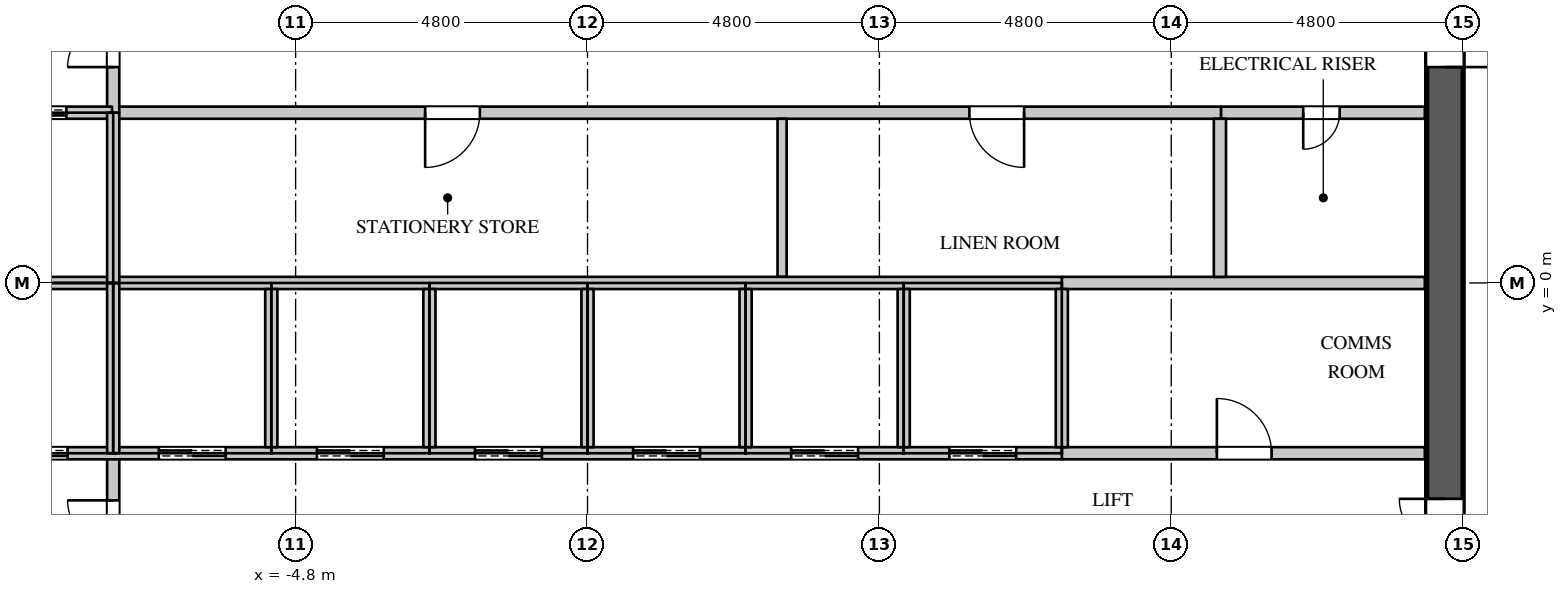
"""IFC4 building model, lengths in metres.
Left out: names, types, materials, properties, quantities, classifications, styles, units other than length and angle.
Written with IfcOpenShell. Run it as: python <this file> out.ifc"""

import sys

from ifc_helpers import new_model, si_unit, direction, frame, frame_2d, origin, place, context, subcontext, project, spatial, rectangle, extrude, element, fill, save


model = new_model("IFC4")
c1 = context("Model", 3, precision=1e-05, world=origin(), true_north=direction((0.0, 1.0)))
c2 = subcontext(c1, "Body", "Model", "MODEL_VIEW")
j1 = project(units=[si_unit("LENGTHUNIT", "METRE"), si_unit("PLANEANGLEUNIT", "RADIAN")], contexts=[c1])
p1 = place(None, origin())
s1 = spatial("IfcSite", under=j1, at=p1, CompositionType="ELEMENT")
p2 = place(p1, origin())
s2 = spatial("IfcBuilding", under=s1, at=p2, CompositionType="ELEMENT")
p3 = place(p2, frame((0.0, 0.0, 239.1)))
s3 = spatial("IfcBuildingStorey", under=s2, at=p3, CompositionType="ELEMENT", Elevation=239.1)
p4 = place(p3, frame((14.1, -11.4, 0.0), z_axis=(0.0, 0.0, 1.0), x_axis=(0.0, 1.0, 0.0)))
e1 = element("IfcWall", 1, at=p4, inside=s3, PredefinedType="SHEAR", context=c2, shape_type="SweptSolid", body=[
    extrude(rectangle(XDim=22.8, YDim=0.6, at=frame_2d((11.4, 0.0))), origin(), (0.0, 0.0, 1.0), 4.2),
])
p5 = place(p4, frame((20.45, 0.0, 0.0)))
e2 = element("IfcOpeningElement", 2, at=p5, cuts=e1, PredefinedType="OPENING", context=c2, shape_type="SweptSolid", body=[
    extrude(rectangle(XDim=1.1, YDim=2.2, at=frame_2d((0.55, 1.1))), frame((0.0, 0.31, 0.0), z_axis=(0.0, -1.0, 0.0), x_axis=(1.0, 0.0, 0.0)), (0.0, 0.0, 1.0), 0.62),
])
p6 = place(p4, frame((1.25, 0.0, 0.0)))
e3 = element("IfcOpeningElement", 3, at=p6, cuts=e1, PredefinedType="OPENING", context=c2, shape_type="SweptSolid", body=[
    extrude(rectangle(XDim=1.1, YDim=2.2, at=frame_2d((0.55, 1.1))), frame((0.0, 0.31, 0.0), z_axis=(0.0, -1.0, 0.0), x_axis=(1.0, 0.0, 0.0)), (0.0, 0.0, 1.0), 0.62),
])
p7 = place(p4, frame((14.95, 0.0, 0.0)))
e4 = element("IfcOpeningElement", 4, at=p7, cuts=e1, PredefinedType="OPENING", context=c2, shape_type="SweptSolid", body=[
    extrude(rectangle(XDim=1.5, YDim=2.4, at=frame_2d((0.75, 1.2))), frame((0.0, 0.31, 0.0), z_axis=(0.0, -1.0, 0.0), x_axis=(1.0, 0.0, 0.0)), (0.0, 0.0, 1.0), 0.62),
])
p8 = place(p4, frame((6.35, 0.0, 0.0)))
e5 = element("IfcOpeningElement", 5, at=p8, cuts=e1, PredefinedType="OPENING", context=c2, shape_type="SweptSolid", body=[
    extrude(rectangle(XDim=1.5, YDim=2.4, at=frame_2d((0.75, 1.2))), frame((0.0, 0.31, 0.0), z_axis=(0.0, -1.0, 0.0), x_axis=(1.0, 0.0, 0.0)), (0.0, 0.0, 1.0), 0.62),
])
p9 = place(p3, frame((-7.82, 2.8, 0.0), z_axis=(0.0, 0.0, 1.0), x_axis=(1.0, 0.0, 0.0)))
e6 = element("IfcWall", 6, at=p9, inside=s3, PredefinedType="PARTITIONING", context=c2, shape_type="SweptSolid", body=[
    extrude(rectangle(XDim=18.24, YDim=0.2, at=frame_2d((9.12, 0.0))), origin(), (0.0, 0.0, 1.0), 3.95),
])
p10 = place(p9, frame((5.15, 0.0, 0.0)))
e7 = element("IfcOpeningElement", 7, at=p10, cuts=e6, PredefinedType="OPENING", context=c2, shape_type="SweptSolid", body=[
    extrude(rectangle(XDim=0.9, YDim=2.2, at=frame_2d((0.45, 1.1))), frame((0.0, 0.11, 0.0), z_axis=(0.0, -1.0, 0.0), x_axis=(1.0, 0.0, 0.0)), (0.0, 0.0, 1.0), 0.22),
])
p11 = place(p9, frame((14.1, 0.0, 0.0)))
e8 = element("IfcOpeningElement", 8, at=p11, cuts=e6, PredefinedType="OPENING", context=c2, shape_type="SweptSolid", body=[
    extrude(rectangle(XDim=0.9, YDim=2.2, at=frame_2d((0.45, 1.1))), frame((0.0, 0.11, 0.0), z_axis=(0.0, -1.0, 0.0), x_axis=(1.0, 0.0, 0.0)), (0.0, 0.0, 1.0), 0.22),
])
p12 = place(p3, frame((-7.8, -8.075, 0.0), z_axis=(0.0, 0.0, 1.0), x_axis=(0.0, 1.0, 0.0)))
e9 = element("IfcWall", 9, at=p12, inside=s3, PredefinedType="PARTITIONING", context=c2, shape_type="SweptSolid", body=[
    extrude(rectangle(XDim=5.275, YDim=0.2, at=frame_2d((2.637, 0.0))), origin(), (0.0, 0.0, 1.0), 3.95),
])
p13 = place(p12, frame((3.0, 0.0, 0.0)))
e10 = element("IfcOpeningElement", 10, at=p13, cuts=e9, PredefinedType="OPENING", context=c2, shape_type="SweptSolid", body=[
    extrude(rectangle(XDim=1.5, YDim=2.4, at=frame_2d((0.75, 1.2))), frame((0.0, 0.11, 0.0), z_axis=(0.0, -1.0, 0.0), x_axis=(1.0, 0.0, 0.0)), (0.0, 0.0, 1.0), 0.22),
])
p14 = place(p3, frame((-7.8, 2.8, 0.0), z_axis=(0.0, 0.0, 1.0), x_axis=(0.0, 1.0, 0.0)))
e11 = element("IfcWall", 11, at=p14, inside=s3, PredefinedType="PARTITIONING", context=c2, shape_type="SweptSolid", body=[
    extrude(rectangle(XDim=5.275, YDim=0.2, at=frame_2d((2.637, 0.0))), origin(), (0.0, 0.0, 1.0), 3.95),
])
p15 = place(p14, frame((0.75, 0.0, 0.0)))
e12 = element("IfcOpeningElement", 12, at=p15, cuts=e11, PredefinedType="OPENING", context=c2, shape_type="SweptSolid", body=[
    extrude(rectangle(XDim=1.5, YDim=2.4, at=frame_2d((0.75, 1.2))), frame((0.0, 0.11, 0.0), z_axis=(0.0, -1.0, 0.0), x_axis=(1.0, 0.0, 0.0)), (0.0, 0.0, 1.0), 0.22),
])
p16 = place(p3, frame((3.2, 0.1, 0.0), z_axis=(0.0, 0.0, 1.0), x_axis=(0.0, 1.0, 0.0)))
e13 = element("IfcWall", 13, at=p16, inside=s3, PredefinedType="PARTITIONING", context=c2, shape_type="SweptSolid", body=[
    extrude(rectangle(XDim=2.6, YDim=0.15, at=frame_2d((1.3, 0.0))), origin(), (0.0, 0.0, 1.0), 3.95),
])
p17 = place(p3, frame((7.8, -2.8, 0.0), z_axis=(0.0, 0.0, 1.0), x_axis=(1.0, 0.0, 0.0)))
e14 = element("IfcWall", 14, at=p17, inside=s3, PredefinedType="PARTITIONING", context=c2, shape_type="SweptSolid", body=[
    extrude(rectangle(XDim=5.97, YDim=0.2, at=frame_2d((2.985, 0.0))), origin(), (0.0, 0.0, 1.0), 3.95),
])
p18 = place(p17, frame((2.55, 0.0, 0.0)))
e15 = element("IfcOpeningElement", 15, at=p18, cuts=e14, PredefinedType="OPENING", context=c2, shape_type="SweptSolid", body=[
    extrude(rectangle(XDim=0.9, YDim=2.2, at=frame_2d((0.45, 1.1))), frame((0.0, 0.11, 0.0), z_axis=(0.0, -1.0, 0.0), x_axis=(1.0, 0.0, 0.0)), (0.0, 0.0, 1.0), 0.22),
])
p19 = place(p3, frame((7.8, 0.0, 0.0), z_axis=(0.0, 0.0, 1.0), x_axis=(1.0, 0.0, 0.0)))
e16 = element("IfcWall", 16, at=p19, inside=s3, PredefinedType="PARTITIONING", context=c2, shape_type="SweptSolid", body=[
    extrude(rectangle(XDim=5.97, YDim=0.2, at=frame_2d((2.985, 0.0))), origin(), (0.0, 0.0, 1.0), 3.95),
])
p20 = place(p3, frame((10.42, 2.8, 0.0), z_axis=(0.0, 0.0, 1.0), x_axis=(1.0, 0.0, 0.0)))
e17 = element("IfcWall", 17, at=p20, inside=s3, PredefinedType="PARTITIONING", context=c2, shape_type="SweptSolid", body=[
    extrude(rectangle(XDim=3.35, YDim=0.2, at=frame_2d((1.675, 0.0))), origin(), (0.0, 0.0, 1.0), 3.95),
])
p21 = place(p20, frame((1.35, 0.0, 0.0)))
e18 = element("IfcOpeningElement", 18, at=p21, cuts=e17, PredefinedType="OPENING", context=c2, shape_type="SweptSolid", body=[
    extrude(rectangle(XDim=0.6, YDim=2.0, at=frame_2d((0.3, 1.0))), frame((0.0, 0.11, 0.0), z_axis=(0.0, -1.0, 0.0), x_axis=(1.0, 0.0, 0.0)), (0.0, 0.0, 1.0), 0.22),
])
p22 = place(p3, frame((10.4, 0.1, 0.0), z_axis=(0.0, 0.0, 1.0), x_axis=(0.0, 1.0, 0.0)))
e19 = element("IfcWall", 19, at=p22, inside=s3, PredefinedType="PARTITIONING", context=c2, shape_type="SweptSolid", body=[
    extrude(rectangle(XDim=2.6, YDim=0.2, at=frame_2d((1.3, 0.0))), origin(), (0.0, 0.0, 1.0), 3.95),
])
p23 = place(p3, frame((-13.77, 0.0, 0.0), z_axis=(0.0, 0.0, 1.0), x_axis=(1.0, 0.0, 0.0)))
e20 = element("IfcWall", 20, at=p23, inside=s3, PredefinedType="PARTITIONING", context=c2, shape_type="SweptSolid", body=[
    extrude(rectangle(XDim=21.57, YDim=0.2, at=frame_2d((10.785, 0.0))), origin(), (0.0, 0.0, 1.0), 3.95),
])
p24 = place(p3, frame((-13.77, 2.8, 0.0), z_axis=(0.0, 0.0, 1.0), x_axis=(1.0, 0.0, 0.0)))
e21 = element("IfcWall", 21, at=p24, inside=s3, PredefinedType="PARTITIONING", context=c2, shape_type="SweptSolid", body=[
    extrude(rectangle(XDim=5.95, YDim=0.2, at=frame_2d((2.975, 0.0))), origin(), (0.0, 0.0, 1.0), 3.95),
])
p25 = place(p24, frame((1.1, 0.0, 0.0)))
e22 = element("IfcOpeningElement", 22, at=p25, cuts=e21, PredefinedType="OPENING", context=c2, shape_type="SweptSolid", body=[
    extrude(rectangle(XDim=1.1, YDim=2.2, at=frame_2d((0.55, 1.1))), frame((0.0, 0.11, 0.0), z_axis=(0.0, -1.0, 0.0), x_axis=(1.0, 0.0, 0.0)), (0.0, 0.0, 1.0), 0.22),
])
p26 = place(p24, frame((4.1, 0.0, 0.0)))
e23 = element("IfcOpeningElement", 23, at=p26, cuts=e21, PredefinedType="OPENING", context=c2, shape_type="SweptSolid", body=[
    extrude(rectangle(XDim=1.1, YDim=2.2, at=frame_2d((0.55, 1.1))), frame((0.0, 0.11, 0.0), z_axis=(0.0, -1.0, 0.0), x_axis=(1.0, 0.0, 0.0)), (0.0, 0.0, 1.0), 0.22),
])
p27 = place(p3, frame((-10.4, -2.8, 0.0), z_axis=(0.0, 0.0, 1.0), x_axis=(1.0, 0.0, 0.0)))
e24 = element("IfcWall", 24, at=p27, inside=s3, PredefinedType="PARTITIONING", context=c2, shape_type="SweptSolid", body=[
    extrude(rectangle(XDim=18.2, YDim=0.2, at=frame_2d((9.1, 0.0))), origin(), (0.0, 0.0, 1.0), 3.95),
])
p28 = place(p27, frame((0.75, 0.0, 0.0)))
e25 = element("IfcOpeningElement", 25, at=p28, cuts=e24, PredefinedType="OPENING", context=c2, shape_type="SweptSolid", body=[
    extrude(rectangle(XDim=1.1, YDim=2.2, at=frame_2d((0.55, 1.1))), frame((0.0, 0.11, 0.0), z_axis=(0.0, -1.0, 0.0), x_axis=(1.0, 0.0, 0.0)), (0.0, 0.0, 1.0), 0.22),
])
p29 = place(p27, frame((3.35, 0.0, 0.0)))
e26 = element("IfcOpeningElement", 26, at=p29, cuts=e24, PredefinedType="OPENING", context=c2, shape_type="SweptSolid", body=[
    extrude(rectangle(XDim=1.1, YDim=2.2, at=frame_2d((0.55, 1.1))), frame((0.0, 0.11, 0.0), z_axis=(0.0, -1.0, 0.0), x_axis=(1.0, 0.0, 0.0)), (0.0, 0.0, 1.0), 0.22),
])
p30 = place(p27, frame((5.95, 0.0, 0.0)))
e27 = element("IfcOpeningElement", 27, at=p30, cuts=e24, PredefinedType="OPENING", context=c2, shape_type="SweptSolid", body=[
    extrude(rectangle(XDim=1.1, YDim=2.2, at=frame_2d((0.55, 1.1))), frame((0.0, 0.11, 0.0), z_axis=(0.0, -1.0, 0.0), x_axis=(1.0, 0.0, 0.0)), (0.0, 0.0, 1.0), 0.22),
])
p31 = place(p27, frame((8.55, 0.0, 0.0)))
e28 = element("IfcOpeningElement", 28, at=p31, cuts=e24, PredefinedType="OPENING", context=c2, shape_type="SweptSolid", body=[
    extrude(rectangle(XDim=1.1, YDim=2.2, at=frame_2d((0.55, 1.1))), frame((0.0, 0.11, 0.0), z_axis=(0.0, -1.0, 0.0), x_axis=(1.0, 0.0, 0.0)), (0.0, 0.0, 1.0), 0.22),
])
p32 = place(p27, frame((11.15, 0.0, 0.0)))
e29 = element("IfcOpeningElement", 29, at=p32, cuts=e24, PredefinedType="OPENING", context=c2, shape_type="SweptSolid", body=[
    extrude(rectangle(XDim=1.1, YDim=2.2, at=frame_2d((0.55, 1.1))), frame((0.0, 0.11, 0.0), z_axis=(0.0, -1.0, 0.0), x_axis=(1.0, 0.0, 0.0)), (0.0, 0.0, 1.0), 0.22),
])
p33 = place(p27, frame((13.75, 0.0, 0.0)))
e30 = element("IfcOpeningElement", 30, at=p33, cuts=e24, PredefinedType="OPENING", context=c2, shape_type="SweptSolid", body=[
    extrude(rectangle(XDim=1.1, YDim=2.2, at=frame_2d((0.55, 1.1))), frame((0.0, 0.11, 0.0), z_axis=(0.0, -1.0, 0.0), x_axis=(1.0, 0.0, 0.0)), (0.0, 0.0, 1.0), 0.22),
])
p34 = place(p27, frame((16.35, 0.0, 0.0)))
e31 = element("IfcOpeningElement", 31, at=p34, cuts=e24, PredefinedType="OPENING", context=c2, shape_type="SweptSolid", body=[
    extrude(rectangle(XDim=1.1, YDim=2.2, at=frame_2d((0.55, 1.1))), frame((0.0, 0.11, 0.0), z_axis=(0.0, -1.0, 0.0), x_axis=(1.0, 0.0, 0.0)), (0.0, 0.0, 1.0), 0.22),
])
for number, where, z_axis, x_axis in (
    (32, (-7.8, -2.8, 0.0), (0.0, 0.0, 1.0), (0.0, 1.0, 0.0)),
    (33, (-7.8, 0.0, 0.0), (0.0, 0.0, 1.0), (0.0, 1.0, 0.0)),
):
    element("IfcWall", number, at=place(p3, frame(where, z_axis=z_axis, x_axis=x_axis)), inside=s3, PredefinedType="PARTITIONING", context=c2, shape_type="SweptSolid", body=[
        extrude(rectangle(XDim=2.8, YDim=0.2, at=frame_2d((1.4, 0.0))), origin(), (0.0, 0.0, 1.0), 3.95),
    ])
for number, where, z_axis, x_axis in (
    (34, (-5.2, -2.7, 0.0), (0.0, 0.0, 1.0), (0.0, 1.0, 0.0)),
    (35, (-2.6, -2.7, 0.0), (0.0, 0.0, 1.0), (0.0, 1.0, 0.0)),
    (36, (0.0, -2.7, 0.0), (0.0, 0.0, 1.0), (0.0, 1.0, 0.0)),
    (37, (2.6, -2.7, 0.0), (0.0, 0.0, 1.0), (0.0, 1.0, 0.0)),
    (38, (5.2, -2.7, 0.0), (0.0, 0.0, 1.0), (0.0, 1.0, 0.0)),
    (39, (7.8, -2.7, 0.0), (0.0, 0.0, 1.0), (0.0, 1.0, 0.0)),
):
    element("IfcWall", number, at=place(p3, frame(where, z_axis=z_axis, x_axis=x_axis)), inside=s3, PredefinedType="PARTITIONING", context=c2, shape_type="SweptSolid", body=[
        extrude(rectangle(XDim=2.6, YDim=0.2, at=frame_2d((1.3, 0.0))), origin(), (0.0, 0.0, 1.0), 3.95),
    ])
p35 = place(p21, origin())
e40 = element("IfcDoor", 40, at=p35, inside=s3, OperationType="SINGLE_SWING_RIGHT", PredefinedType="DOOR", context=c2, shape_type="SweptSolid", body=[
    extrude(rectangle(XDim=0.6, YDim=2.0, at=frame_2d((0.3, 1.0))), frame((0.0, 0.025, 0.0), z_axis=(0.0, -1.0, 0.0), x_axis=(1.0, 0.0, 0.0)), (0.0, 0.0, 1.0), 0.05),
])
fill(e18, e40)
p36 = place(p18, origin())
e41 = element("IfcDoor", 41, at=p36, inside=s3, OperationType="SINGLE_SWING_LEFT", PredefinedType="DOOR", context=c2, shape_type="SweptSolid", body=[
    extrude(rectangle(XDim=0.9, YDim=2.2, at=frame_2d((0.45, 1.1))), frame((0.0, 0.025, 0.0), z_axis=(0.0, -1.0, 0.0), x_axis=(1.0, 0.0, 0.0)), (0.0, 0.0, 1.0), 0.05),
])
fill(e15, e41)
p37 = place(p10, origin())
e42 = element("IfcDoor", 42, at=p37, inside=s3, OperationType="SINGLE_SWING_RIGHT", PredefinedType="DOOR", context=c2, shape_type="SweptSolid", body=[
    extrude(rectangle(XDim=0.9, YDim=2.2, at=frame_2d((0.45, 1.1))), frame((0.0, 0.025, 0.0), z_axis=(0.0, -1.0, 0.0), x_axis=(1.0, 0.0, 0.0)), (0.0, 0.0, 1.0), 0.05),
])
fill(e7, e42)
p38 = place(p11, origin())
e43 = element("IfcDoor", 43, at=p38, inside=s3, OperationType="SINGLE_SWING_LEFT", PredefinedType="DOOR", context=c2, shape_type="SweptSolid", body=[
    extrude(rectangle(XDim=0.9, YDim=2.2, at=frame_2d((0.45, 1.1))), frame((0.0, 0.025, 0.0), z_axis=(0.0, -1.0, 0.0), x_axis=(1.0, 0.0, 0.0)), (0.0, 0.0, 1.0), 0.05),
])
fill(e8, e43)
p39 = place(p26, origin())
e44 = element("IfcDoor", 44, at=p39, inside=s3, OperationType="DOUBLE_DOOR_SLIDING", PredefinedType="DOOR", context=c2, shape_type="SweptSolid", body=[
    extrude(rectangle(XDim=1.1, YDim=2.2, at=frame_2d((0.55, 1.1))), frame((0.0, 0.025, 0.0), z_axis=(0.0, -1.0, 0.0), x_axis=(1.0, 0.0, 0.0)), (0.0, 0.0, 1.0), 0.05),
])
fill(e23, e44)
p40 = place(p28, origin())
e45 = element("IfcDoor", 45, at=p40, inside=s3, OperationType="DOUBLE_DOOR_SLIDING", PredefinedType="DOOR", context=c2, shape_type="SweptSolid", body=[
    extrude(rectangle(XDim=1.1, YDim=2.2, at=frame_2d((0.55, 1.1))), frame((0.0, 0.025, 0.0), z_axis=(0.0, -1.0, 0.0), x_axis=(1.0, 0.0, 0.0)), (0.0, 0.0, 1.0), 0.05),
])
fill(e25, e45)
p41 = place(p29, origin())
e46 = element("IfcDoor", 46, at=p41, inside=s3, OperationType="DOUBLE_DOOR_SLIDING", PredefinedType="DOOR", context=c2, shape_type="SweptSolid", body=[
    extrude(rectangle(XDim=1.1, YDim=2.2, at=frame_2d((0.55, 1.1))), frame((0.0, 0.025, 0.0), z_axis=(0.0, -1.0, 0.0), x_axis=(1.0, 0.0, 0.0)), (0.0, 0.0, 1.0), 0.05),
])
fill(e26, e46)
p42 = place(p30, origin())
e47 = element("IfcDoor", 47, at=p42, inside=s3, OperationType="DOUBLE_DOOR_SLIDING", PredefinedType="DOOR", context=c2, shape_type="SweptSolid", body=[
    extrude(rectangle(XDim=1.1, YDim=2.2, at=frame_2d((0.55, 1.1))), frame((0.0, 0.025, 0.0), z_axis=(0.0, -1.0, 0.0), x_axis=(1.0, 0.0, 0.0)), (0.0, 0.0, 1.0), 0.05),
])
fill(e27, e47)
p43 = place(p31, origin())
e48 = element("IfcDoor", 48, at=p43, inside=s3, OperationType="DOUBLE_DOOR_SLIDING", PredefinedType="DOOR", context=c2, shape_type="SweptSolid", body=[
    extrude(rectangle(XDim=1.1, YDim=2.2, at=frame_2d((0.55, 1.1))), frame((0.0, 0.025, 0.0), z_axis=(0.0, -1.0, 0.0), x_axis=(1.0, 0.0, 0.0)), (0.0, 0.0, 1.0), 0.05),
])
fill(e28, e48)
p44 = place(p32, origin())
e49 = element("IfcDoor", 49, at=p44, inside=s3, OperationType="DOUBLE_DOOR_SLIDING", PredefinedType="DOOR", context=c2, shape_type="SweptSolid", body=[
    extrude(rectangle(XDim=1.1, YDim=2.2, at=frame_2d((0.55, 1.1))), frame((0.0, 0.025, 0.0), z_axis=(0.0, -1.0, 0.0), x_axis=(1.0, 0.0, 0.0)), (0.0, 0.0, 1.0), 0.05),
])
fill(e29, e49)
p45 = place(p33, origin())
e50 = element("IfcDoor", 50, at=p45, inside=s3, OperationType="DOUBLE_DOOR_SLIDING", PredefinedType="DOOR", context=c2, shape_type="SweptSolid", body=[
    extrude(rectangle(XDim=1.1, YDim=2.2, at=frame_2d((0.55, 1.1))), frame((0.0, 0.025, 0.0), z_axis=(0.0, -1.0, 0.0), x_axis=(1.0, 0.0, 0.0)), (0.0, 0.0, 1.0), 0.05),
])
fill(e30, e50)
p46 = place(p34, origin())
e51 = element("IfcDoor", 51, at=p46, inside=s3, OperationType="DOUBLE_DOOR_SLIDING", PredefinedType="DOOR", context=c2, shape_type="SweptSolid", body=[
    extrude(rectangle(XDim=1.1, YDim=2.2, at=frame_2d((0.55, 1.1))), frame((0.0, 0.025, 0.0), z_axis=(0.0, -1.0, 0.0), x_axis=(1.0, 0.0, 0.0)), (0.0, 0.0, 1.0), 0.05),
])
fill(e31, e51)
p47 = place(p15, origin())
e52 = element("IfcDoor", 52, at=p47, inside=s3, OperationType="DOUBLE_DOOR_SINGLE_SWING", PredefinedType="DOOR", context=c2, shape_type="SweptSolid", body=[
    extrude(rectangle(XDim=1.5, YDim=2.4, at=frame_2d((0.75, 1.2))), frame((0.0, 0.025, 0.0), z_axis=(0.0, -1.0, 0.0), x_axis=(1.0, 0.0, 0.0)), (0.0, 0.0, 1.0), 0.05),
])
fill(e12, e52)
p48 = place(p13, origin())
e53 = element("IfcDoor", 53, at=p48, inside=s3, OperationType="DOUBLE_DOOR_SINGLE_SWING", PredefinedType="DOOR", context=c2, shape_type="SweptSolid", body=[
    extrude(rectangle(XDim=1.5, YDim=2.4, at=frame_2d((0.75, 1.2))), frame((0.0, 0.025, 0.0), z_axis=(0.0, -1.0, 0.0), x_axis=(1.0, 0.0, 0.0)), (0.0, 0.0, 1.0), 0.05),
])
fill(e10, e53)
p49 = place(p7, origin())
e54 = element("IfcDoor", 54, at=p49, inside=s3, OperationType="DOUBLE_DOOR_SINGLE_SWING", PredefinedType="DOOR", context=c2, shape_type="SweptSolid", body=[
    extrude(rectangle(XDim=1.5, YDim=2.4, at=frame_2d((0.75, 1.2))), frame((0.0, -0.245, 0.0), z_axis=(0.0, -1.0, 0.0), x_axis=(1.0, 0.0, 0.0)), (0.0, 0.0, 1.0), 0.05),
])
fill(e4, e54)
p50 = place(p8, origin())
e55 = element("IfcDoor", 55, at=p50, inside=s3, OperationType="DOUBLE_DOOR_SINGLE_SWING", PredefinedType="DOOR", context=c2, shape_type="SweptSolid", body=[
    extrude(rectangle(XDim=1.5, YDim=2.4, at=frame_2d((0.75, 1.2))), frame((0.0, 0.295, 0.0), z_axis=(0.0, -1.0, 0.0), x_axis=(1.0, 0.0, 0.0)), (0.0, 0.0, 1.0), 0.05),
])
fill(e5, e55)
save(model, sys.argv[1])
